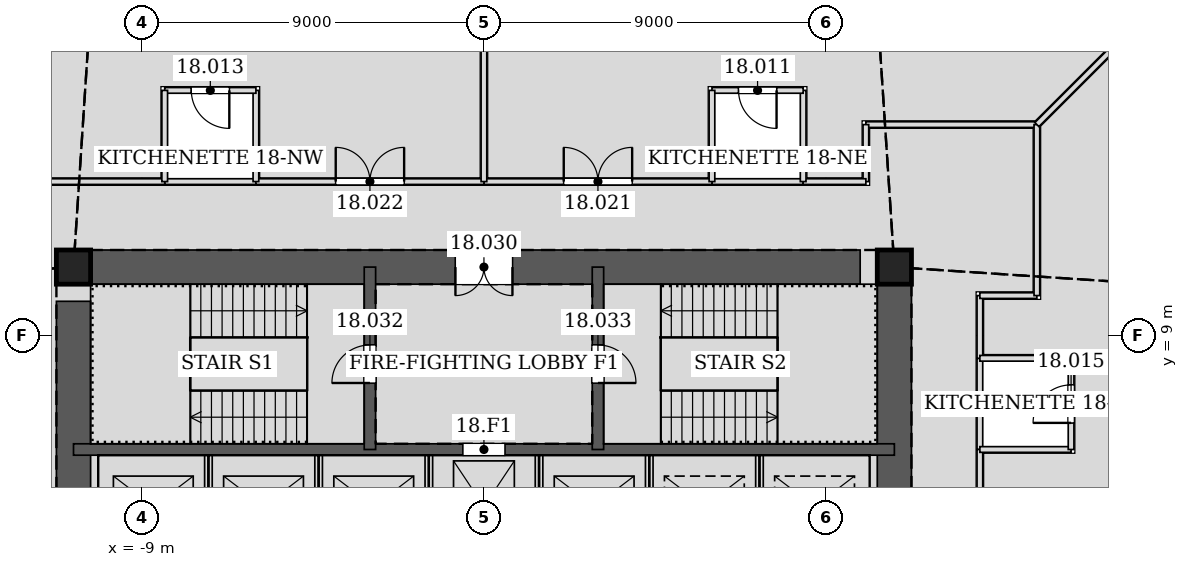
"""IFC4 building model, lengths in metres.
Left out: names, types, materials, properties, quantities, classifications, styles, units other than length and angle.
Written with IfcOpenShell. Run it as: python <this file> out.ifc"""

import sys

from ifc_helpers import new_model, si_unit, direction, frame, frame_2d, origin, origin_2d, place, context, subcontext, project, spatial, rectangle, hollow_rectangle, extrude, element, fill, save


model = new_model("IFC4")
c1 = context("Model", 3, precision=1e-05, world=origin(), true_north=direction((0.0, 1.0)))
c2 = subcontext(c1, "Body", "Model", "MODEL_VIEW")
j1 = project(units=[si_unit("LENGTHUNIT", "METRE"), si_unit("PLANEANGLEUNIT", "RADIAN")], contexts=[c1])
p1 = place(None, origin())
s1 = spatial("IfcSite", under=j1, at=p1, CompositionType="ELEMENT")
p2 = place(p1, origin())
s2 = spatial("IfcBuilding", under=s1, at=p2, CompositionType="ELEMENT")
p3 = place(p2, frame((0.0, 0.0, 83.4)))
s3 = spatial("IfcBuildingStorey", under=s2, at=p3, CompositionType="ELEMENT", Elevation=83.4)
for number, where, z_axis, x_axis in (
    (1, (10.8, 10.8, 0.0), (0.0, 0.0, 1.0), (1.0, 0.0, 0.0)),
    (2, (-10.8, 10.8, 0.0), (0.0, 0.0, 1.0), (1.0, 0.0, 0.0)),
):
    element("IfcColumn", number, at=place(p3, frame(where, z_axis=z_axis, x_axis=x_axis)), inside=s3, PredefinedType="COLUMN", context=c2, shape_type="SweptSolid", body=[
        extrude(hollow_rectangle(XDim=0.9, YDim=0.9, WallThickness=0.06, at=origin_2d()), origin(), (0.0, 0.0, 1.0), 4.2),
    ])
p4 = place(p3, frame((10.8, -10.8, 0.0), z_axis=(0.0, 0.0, 1.0), x_axis=(0.0, 1.0, 0.0)))
e3 = element("IfcWall", 3, at=p4, inside=s3, PredefinedType="SOLIDWALL", context=c2, shape_type="SweptSolid", body=[
    extrude(rectangle(XDim=21.6, YDim=0.9, at=frame_2d((10.8, 0.0))), origin(), (0.0, 0.0, 1.0), 4.2),
])
p5 = place(p4, frame((11.7, 0.0, 0.0)))
e4 = element("IfcOpeningElement", 4, at=p5, cuts=e3, PredefinedType="OPENING", context=c2, shape_type="SweptSolid", body=[
    extrude(rectangle(XDim=1.2, YDim=2.1, at=frame_2d((0.6, 1.05))), frame((0.0, 0.46, 0.0), z_axis=(0.0, -1.0, 0.0), x_axis=(1.0, 0.0, 0.0)), (0.0, 0.0, 1.0), 0.92),
])
p6 = place(p4, frame((8.7, 0.0, 0.0)))
e5 = element("IfcOpeningElement", 5, at=p6, cuts=e3, PredefinedType="OPENING", context=c2, shape_type="SweptSolid", body=[
    extrude(rectangle(XDim=1.2, YDim=2.1, at=frame_2d((0.6, 1.05))), frame((0.0, 0.46, 0.0), z_axis=(0.0, -1.0, 0.0), x_axis=(1.0, 0.0, 0.0)), (0.0, 0.0, 1.0), 0.92),
])
p7 = place(p3, frame((10.8, 10.8, 0.0), z_axis=(0.0, 0.0, 1.0), x_axis=(-1.0, 0.0, 0.0)))
e6 = element("IfcWall", 6, at=p7, inside=s3, PredefinedType="SOLIDWALL", context=c2, shape_type="SweptSolid", body=[
    extrude(rectangle(XDim=21.6, YDim=0.9, at=frame_2d((10.8, 0.0))), origin(), (0.0, 0.0, 1.0), 4.2),
])
p8 = place(p7, frame((10.05, 0.0, 0.0)))
e7 = element("IfcOpeningElement", 7, at=p8, cuts=e6, PredefinedType="OPENING", context=c2, shape_type="SweptSolid", body=[
    extrude(rectangle(XDim=1.5, YDim=2.1, at=frame_2d((0.75, 1.05))), frame((0.0, 0.46, 0.0), z_axis=(0.0, -1.0, 0.0), x_axis=(1.0, 0.0, 0.0)), (0.0, 0.0, 1.0), 0.92),
])
p9 = place(p3, frame((-10.8, 10.8, 0.0), z_axis=(0.0, 0.0, 1.0), x_axis=(0.0, -1.0, 0.0)))
e8 = element("IfcWall", 8, at=p9, inside=s3, PredefinedType="SOLIDWALL", context=c2, shape_type="SweptSolid", body=[
    extrude(rectangle(XDim=21.6, YDim=0.9, at=frame_2d((10.8, 0.0))), origin(), (0.0, 0.0, 1.0), 4.2),
])
p10 = place(p9, frame((8.7, 0.0, 0.0)))
e9 = element("IfcOpeningElement", 9, at=p10, cuts=e8, PredefinedType="OPENING", context=c2, shape_type="SweptSolid", body=[
    extrude(rectangle(XDim=1.2, YDim=2.1, at=frame_2d((0.6, 1.05))), frame((0.0, 0.46, 0.0), z_axis=(0.0, -1.0, 0.0), x_axis=(1.0, 0.0, 0.0)), (0.0, 0.0, 1.0), 0.92),
])
p11 = place(p9, frame((11.7, 0.0, 0.0)))
e10 = element("IfcOpeningElement", 10, at=p11, cuts=e8, PredefinedType="OPENING", context=c2, shape_type="SweptSolid", body=[
    extrude(rectangle(XDim=1.2, YDim=2.1, at=frame_2d((0.6, 1.05))), frame((0.0, 0.46, 0.0), z_axis=(0.0, -1.0, 0.0), x_axis=(1.0, 0.0, 0.0)), (0.0, 0.0, 1.0), 0.92),
])
p12 = place(p3, frame((-10.8, 6.0, 0.0), z_axis=(0.0, 0.0, 1.0), x_axis=(1.0, 0.0, 0.0)))
e11 = element("IfcWall", 11, at=p12, inside=s3, PredefinedType="SOLIDWALL", context=c2, shape_type="SweptSolid", body=[
    extrude(rectangle(XDim=21.6, YDim=0.3, at=frame_2d((10.8, 0.0))), origin(), (0.0, 0.0, 1.0), 4.2),
])
p13 = place(p12, frame((10.25, 0.0, 0.0)))
e12 = element("IfcOpeningElement", 12, at=p13, cuts=e11, PredefinedType="OPENING", context=c2, shape_type="SweptSolid", body=[
    extrude(rectangle(XDim=1.1, YDim=2.1, at=frame_2d((0.55, 1.05))), frame((0.0, 0.16, 0.0), z_axis=(0.0, -1.0, 0.0), x_axis=(1.0, 0.0, 0.0)), (0.0, 0.0, 1.0), 0.32),
])
p14 = place(p3, frame((-3.0, 6.0, 0.0), z_axis=(0.0, 0.0, 1.0), x_axis=(0.0, 1.0, 0.0)))
e13 = element("IfcWall", 13, at=p14, inside=s3, PredefinedType="SOLIDWALL", context=c2, shape_type="SweptSolid", body=[
    extrude(rectangle(XDim=4.8, YDim=0.3, at=frame_2d((2.4, 0.0))), origin(), (0.0, 0.0, 1.0), 4.2),
])
p15 = place(p14, frame((1.75, 0.0, 0.0)))
e14 = element("IfcOpeningElement", 14, at=p15, cuts=e13, PredefinedType="OPENING", context=c2, shape_type="SweptSolid", body=[
    extrude(rectangle(XDim=1.0, YDim=2.1, at=frame_2d((0.5, 1.05))), frame((0.0, 0.16, 0.0), z_axis=(0.0, -1.0, 0.0), x_axis=(1.0, 0.0, 0.0)), (0.0, 0.0, 1.0), 0.32),
])
p16 = place(p3, frame((3.0, 6.0, 0.0), z_axis=(0.0, 0.0, 1.0), x_axis=(0.0, 1.0, 0.0)))
e15 = element("IfcWall", 15, at=p16, inside=s3, PredefinedType="SOLIDWALL", context=c2, shape_type="SweptSolid", body=[
    extrude(rectangle(XDim=4.8, YDim=0.3, at=frame_2d((2.4, 0.0))), origin(), (0.0, 0.0, 1.0), 4.2),
])
p17 = place(p16, frame((1.75, 0.0, 0.0)))
e16 = element("IfcOpeningElement", 16, at=p17, cuts=e15, PredefinedType="OPENING", context=c2, shape_type="SweptSolid", body=[
    extrude(rectangle(XDim=1.0, YDim=2.1, at=frame_2d((0.5, 1.05))), frame((0.0, 0.16, 0.0), z_axis=(0.0, -1.0, 0.0), x_axis=(1.0, 0.0, 0.0)), (0.0, 0.0, 1.0), 0.32),
])
for number, where, z_axis, x_axis in (
    (17, (8.401, 13.05, 0.0), (0.0, 0.0, 1.0), (-1.0, 0.0, 0.0)),
    (18, (-5.999, 13.05, 0.0), (0.0, 0.0, 1.0), (-1.0, 0.0, 0.0)),
    (19, (13.05, 5.999, 0.0), (0.0, 0.0, 1.0), (0.0, 1.0, 0.0)),
):
    element("IfcWall", number, at=place(p3, frame(where, z_axis=z_axis, x_axis=x_axis)), inside=s3, PredefinedType="PARTITIONING", context=c2, shape_type="SweptSolid", body=[
        extrude(rectangle(XDim=2.402, YDim=0.15, at=frame_2d((1.201, 0.0))), origin(), (0.0, 0.0, 1.0), 4.035),
    ])
p18 = place(p3, frame((6.001, 13.05, 0.0), z_axis=(0.0, 0.0, 1.0), x_axis=(-1.0, 0.0, 0.0)))
e20 = element("IfcWall", 20, at=p18, inside=s3, PredefinedType="PARTITIONING", context=c2, shape_type="SweptSolid", body=[
    extrude(rectangle(XDim=6.002, YDim=0.15, at=frame_2d((3.001, 0.0))), origin(), (0.0, 0.0, 1.0), 3.065),
])
p19 = place(p18, frame((2.101, 0.0, 0.0)))
e21 = element("IfcOpeningElement", 21, at=p19, cuts=e20, PredefinedType="OPENING", context=c2, shape_type="SweptSolid", body=[
    extrude(rectangle(XDim=1.8, YDim=2.4, at=frame_2d((0.9, 1.2))), frame((0.0, 0.085, 0.0), z_axis=(0.0, -1.0, 0.0), x_axis=(1.0, 0.0, 0.0)), (0.0, 0.0, 1.0), 0.17),
])
p20 = place(p3, frame((14.55, 14.55, 0.0), z_axis=(0.0, 0.0, 1.0), x_axis=(-1.0, 0.0, 0.0)))
e22 = element("IfcWall", 22, at=p20, inside=s3, PredefinedType="PARTITIONING", context=c2, shape_type="SweptSolid", body=[
    extrude(rectangle(XDim=4.5, YDim=0.15, at=frame_2d((2.25, 0.0))), origin(), (0.0, 0.0, 1.0), 3.014),
])
p21 = place(p3, frame((10.05, 14.55, 0.0), z_axis=(0.0, 0.0, 1.0), x_axis=(0.0, -1.0, 0.0)))
e23 = element("IfcWall", 23, at=p21, inside=s3, PredefinedType="PARTITIONING", context=c2, shape_type="SweptSolid", body=[
    extrude(rectangle(XDim=1.5, YDim=0.15, at=frame_2d((0.75, 0.0))), origin(), (0.0, 0.0, 1.0), 3.492),
])
p22 = place(p3, frame((10.05, 13.05, 0.0), z_axis=(0.0, 0.0, 1.0), x_axis=(-1.0, 0.0, 0.0)))
e24 = element("IfcWall", 24, at=p22, inside=s3, PredefinedType="PARTITIONING", context=c2, shape_type="SweptSolid", body=[
    extrude(rectangle(XDim=1.651, YDim=0.15, at=frame_2d((0.826, 0.0))), origin(), (0.0, 0.0, 1.0), 4.035),
])
p23 = place(p3, frame((-8.399, 13.05, 0.0), z_axis=(0.0, 0.0, 1.0), x_axis=(-1.0, 0.0, 0.0)))
e25 = element("IfcWall", 25, at=p23, inside=s3, PredefinedType="PARTITIONING", context=c2, shape_type="SweptSolid", body=[
    extrude(rectangle(XDim=4.651, YDim=0.15, at=frame_2d((2.326, 0.0))), origin(), (0.0, 0.0, 1.0), 3.014),
])
p24 = place(p3, frame((0.001, 13.05, 0.0), z_axis=(0.0, 0.0, 1.0), x_axis=(-1.0, 0.0, 0.0)))
e26 = element("IfcWall", 26, at=p24, inside=s3, PredefinedType="PARTITIONING", context=c2, shape_type="SweptSolid", body=[
    extrude(rectangle(XDim=6.002, YDim=0.15, at=frame_2d((3.001, 0.0))), origin(), (0.0, 0.0, 1.0), 3.065),
])
p25 = place(p24, frame((2.101, 0.0, 0.0)))
e27 = element("IfcOpeningElement", 27, at=p25, cuts=e26, PredefinedType="OPENING", context=c2, shape_type="SweptSolid", body=[
    extrude(rectangle(XDim=1.8, YDim=2.4, at=frame_2d((0.9, 1.2))), frame((0.0, 0.085, 0.0), z_axis=(0.0, -1.0, 0.0), x_axis=(1.0, 0.0, 0.0)), (0.0, 0.0, 1.0), 0.17),
])
p26 = place(p3, frame((13.05, -10.05, 0.0), z_axis=(0.0, 0.0, 1.0), x_axis=(0.0, 1.0, 0.0)))
e28 = element("IfcWall", 28, at=p26, inside=s3, PredefinedType="PARTITIONING", context=c2, shape_type="SweptSolid", body=[
    extrude(rectangle(XDim=16.051, YDim=0.15, at=frame_2d((8.025, 0.0))), origin(), (0.0, 0.0, 1.0), 3.065),
])
p27 = place(p26, frame((7.125, 0.0, 0.0)))
e29 = element("IfcOpeningElement", 29, at=p27, cuts=e28, PredefinedType="OPENING", context=c2, shape_type="SweptSolid", body=[
    extrude(rectangle(XDim=1.8, YDim=2.4, at=frame_2d((0.9, 1.2))), frame((0.0, 0.085, 0.0), z_axis=(0.0, -1.0, 0.0), x_axis=(1.0, 0.0, 0.0)), (0.0, 0.0, 1.0), 0.17),
])
p28 = place(p3, frame((13.05, 8.399, 0.0), z_axis=(0.0, 0.0, 1.0), x_axis=(0.0, 1.0, 0.0)))
e30 = element("IfcWall", 30, at=p28, inside=s3, PredefinedType="PARTITIONING", context=c2, shape_type="SweptSolid", body=[
    extrude(rectangle(XDim=1.651, YDim=0.15, at=frame_2d((0.826, 0.0))), origin(), (0.0, 0.0, 1.0), 4.035),
])
p29 = place(p3, frame((13.05, 10.05, 0.0), z_axis=(0.0, 0.0, 1.0), x_axis=(1.0, 0.0, 0.0)))
e31 = element("IfcWall", 31, at=p29, inside=s3, PredefinedType="PARTITIONING", context=c2, shape_type="SweptSolid", body=[
    extrude(rectangle(XDim=1.5, YDim=0.15, at=frame_2d((0.75, 0.0))), origin(), (0.0, 0.0, 1.0), 3.492),
])
p30 = place(p3, frame((14.55, 10.05, 0.0), z_axis=(0.0, 0.0, 1.0), x_axis=(0.0, 1.0, 0.0)))
e32 = element("IfcWall", 32, at=p30, inside=s3, PredefinedType="PARTITIONING", context=c2, shape_type="SweptSolid", body=[
    extrude(rectangle(XDim=4.5, YDim=0.15, at=frame_2d((2.25, 0.0))), origin(), (0.0, 0.0, 1.0), 3.014),
])
p31 = place(p3, frame((8.4, 13.05, 0.0), z_axis=(0.0, 0.0, 1.0), x_axis=(0.0, 1.0, 0.0)))
e33 = element("IfcWall", 33, at=p31, inside=s3, PredefinedType="PARTITIONING", context=c2, shape_type="SweptSolid", body=[
    extrude(rectangle(XDim=2.4, YDim=0.15, at=frame_2d((1.2, 0.0))), origin(), (0.0, 0.0, 1.0), 3.492),
])
p32 = place(p3, frame((8.4, 15.45, 0.0), z_axis=(0.0, 0.0, 1.0), x_axis=(-1.0, 0.0, 0.0)))
e34 = element("IfcWall", 34, at=p32, inside=s3, PredefinedType="PARTITIONING", context=c2, shape_type="SweptSolid", body=[
    extrude(rectangle(XDim=2.4, YDim=0.15, at=frame_2d((1.2, 0.0))), origin(), (0.0, 0.0, 1.0), 4.035),
])
p33 = place(p32, frame((0.7, 0.0, 0.0)))
e35 = element("IfcOpeningElement", 35, at=p33, cuts=e34, PredefinedType="OPENING", context=c2, shape_type="SweptSolid", body=[
    extrude(rectangle(XDim=1.0, YDim=2.1, at=frame_2d((0.5, 1.05))), frame((0.0, 0.085, 0.0), z_axis=(0.0, -1.0, 0.0), x_axis=(1.0, 0.0, 0.0)), (0.0, 0.0, 1.0), 0.17),
])
for number, where, z_axis, x_axis in (
    (36, (6.0, 15.45, 0.0), (0.0, 0.0, 1.0), (0.0, -1.0, 0.0)),
    (37, (-6.0, 13.05, 0.0), (0.0, 0.0, 1.0), (0.0, 1.0, 0.0)),
):
    element("IfcWall", number, at=place(p3, frame(where, z_axis=z_axis, x_axis=x_axis)), inside=s3, PredefinedType="PARTITIONING", context=c2, shape_type="SweptSolid", body=[
        extrude(rectangle(XDim=2.4, YDim=0.15, at=frame_2d((1.2, 0.0))), origin(), (0.0, 0.0, 1.0), 3.492),
    ])
p34 = place(p3, frame((-6.0, 15.45, 0.0), z_axis=(0.0, 0.0, 1.0), x_axis=(-1.0, 0.0, 0.0)))
e38 = element("IfcWall", 38, at=p34, inside=s3, PredefinedType="PARTITIONING", context=c2, shape_type="SweptSolid", body=[
    extrude(rectangle(XDim=2.4, YDim=0.15, at=frame_2d((1.2, 0.0))), origin(), (0.0, 0.0, 1.0), 4.035),
])
p35 = place(p34, frame((0.7, 0.0, 0.0)))
e39 = element("IfcOpeningElement", 39, at=p35, cuts=e38, PredefinedType="OPENING", context=c2, shape_type="SweptSolid", body=[
    extrude(rectangle(XDim=1.0, YDim=2.1, at=frame_2d((0.5, 1.05))), frame((0.0, 0.085, 0.0), z_axis=(0.0, -1.0, 0.0), x_axis=(1.0, 0.0, 0.0)), (0.0, 0.0, 1.0), 0.17),
])
for number, where, z_axis, x_axis in (
    (40, (-8.4, 15.45, 0.0), (0.0, 0.0, 1.0), (0.0, -1.0, 0.0)),
    (41, (13.05, 6.0, 0.0), (0.0, 0.0, 1.0), (1.0, 0.0, 0.0)),
):
    element("IfcWall", number, at=place(p3, frame(where, z_axis=z_axis, x_axis=x_axis)), inside=s3, PredefinedType="PARTITIONING", context=c2, shape_type="SweptSolid", body=[
        extrude(rectangle(XDim=2.4, YDim=0.15, at=frame_2d((1.2, 0.0))), origin(), (0.0, 0.0, 1.0), 3.492),
    ])
p36 = place(p3, frame((15.45, 6.0, 0.0), z_axis=(0.0, 0.0, 1.0), x_axis=(0.0, 1.0, 0.0)))
e42 = element("IfcWall", 42, at=p36, inside=s3, PredefinedType="PARTITIONING", context=c2, shape_type="SweptSolid", body=[
    extrude(rectangle(XDim=2.4, YDim=0.15, at=frame_2d((1.2, 0.0))), origin(), (0.0, 0.0, 1.0), 4.035),
])
p37 = place(p36, frame((0.7, 0.0, 0.0)))
e43 = element("IfcOpeningElement", 43, at=p37, cuts=e42, PredefinedType="OPENING", context=c2, shape_type="SweptSolid", body=[
    extrude(rectangle(XDim=1.0, YDim=2.1, at=frame_2d((0.5, 1.05))), frame((0.0, 0.085, 0.0), z_axis=(0.0, -1.0, 0.0), x_axis=(1.0, 0.0, 0.0)), (0.0, 0.0, 1.0), 0.17),
])
p38 = place(p3, frame((15.45, 8.4, 0.0), z_axis=(0.0, 0.0, 1.0), x_axis=(-1.0, 0.0, 0.0)))
e44 = element("IfcWall", 44, at=p38, inside=s3, PredefinedType="PARTITIONING", context=c2, shape_type="SweptSolid", body=[
    extrude(rectangle(XDim=2.4, YDim=0.15, at=frame_2d((1.2, 0.0))), origin(), (0.0, 0.0, 1.0), 3.492),
])
p39 = place(p3, frame((0.0, 24.468, 0.0), z_axis=(0.0, 0.0, 1.0), x_axis=(0.0, -1.0, 0.0)))
e45 = element("IfcWall", 45, at=p39, inside=s3, PredefinedType="PARTITIONING", context=c2, shape_type="SweptSolid", body=[
    extrude(rectangle(XDim=11.417, YDim=0.15, at=frame_2d((5.709, 0.0))), origin(), (0.0, 0.0, 1.0), 3.065),
])
p40 = place(p3, frame((14.55, 14.55, 0.0), z_axis=(0.0, 0.0, 1.0), x_axis=(0.707106781187, 0.707106781187, 0.0)))
e46 = element("IfcWall", 46, at=p40, inside=s3, PredefinedType="PARTITIONING", context=c2, shape_type="SweptSolid", body=[
    extrude(rectangle(XDim=3.891, YDim=0.15, at=frame_2d((1.945, 0.0))), origin(), (0.0, 0.0, 1.0), 3.113),
])
for number, where, z_axis, x_axis in (
    (47, (-7.25, 3.15, 0.0), (0.0, 0.0, 1.0), (0.0, 1.0, 0.0)),
    (48, (-4.35, 3.15, 0.0), (0.0, 0.0, 1.0), (0.0, 1.0, 0.0)),
    (49, (-1.45, 3.15, 0.0), (0.0, 0.0, 1.0), (0.0, 1.0, 0.0)),
    (50, (1.45, 3.15, 0.0), (0.0, 0.0, 1.0), (0.0, 1.0, 0.0)),
    (51, (4.35, 3.15, 0.0), (0.0, 0.0, 1.0), (0.0, 1.0, 0.0)),
    (52, (7.25, 3.15, 0.0), (0.0, 0.0, 1.0), (0.0, 1.0, 0.0)),
):
    element("IfcWall", number, at=place(p3, frame(where, z_axis=z_axis, x_axis=x_axis)), inside=s3, PredefinedType="PARTITIONING", context=c2, shape_type="SweptSolid", body=[
        extrude(rectangle(XDim=2.7, YDim=0.2, at=frame_2d((1.35, 0.0))), origin(), (0.0, 0.0, 1.0), 4.2),
    ])
p41 = place(p33, origin())
e53 = element("IfcDoor", 53, at=p41, inside=s3, OperationType="SINGLE_SWING_LEFT", PredefinedType="DOOR", context=c2, shape_type="SweptSolid", body=[
    extrude(rectangle(XDim=1.0, YDim=2.1, at=frame_2d((0.5, 1.05))), frame((0.0, 0.025, 0.0), z_axis=(0.0, -1.0, 0.0), x_axis=(1.0, 0.0, 0.0)), (0.0, 0.0, 1.0), 0.05),
])
fill(e35, e53)
p42 = place(p35, origin())
e54 = element("IfcDoor", 54, at=p42, inside=s3, OperationType="SINGLE_SWING_LEFT", PredefinedType="DOOR", context=c2, shape_type="SweptSolid", body=[
    extrude(rectangle(XDim=1.0, YDim=2.1, at=frame_2d((0.5, 1.05))), frame((0.0, 0.025, 0.0), z_axis=(0.0, -1.0, 0.0), x_axis=(1.0, 0.0, 0.0)), (0.0, 0.0, 1.0), 0.05),
])
fill(e39, e54)
p43 = place(p37, origin())
e55 = element("IfcDoor", 55, at=p43, inside=s3, OperationType="SINGLE_SWING_LEFT", PredefinedType="DOOR", context=c2, shape_type="SweptSolid", body=[
    extrude(rectangle(XDim=1.0, YDim=2.1, at=frame_2d((0.5, 1.05))), frame((0.0, 0.025, 0.0), z_axis=(0.0, -1.0, 0.0), x_axis=(1.0, 0.0, 0.0)), (0.0, 0.0, 1.0), 0.05),
])
fill(e43, e55)
p44 = place(p19, frame((1.8, 0.0, 0.0), z_axis=(0.0, 0.0, 1.0), x_axis=(-1.0, 0.0, 0.0)))
e56 = element("IfcDoor", 56, at=p44, inside=s3, OperationType="DOUBLE_DOOR_SINGLE_SWING", PredefinedType="DOOR", context=c2, shape_type="SweptSolid", body=[
    extrude(rectangle(XDim=1.8, YDim=2.4, at=frame_2d((0.9, 1.2))), frame((0.0, 0.025, 0.0), z_axis=(0.0, -1.0, 0.0), x_axis=(1.0, 0.0, 0.0)), (0.0, 0.0, 1.0), 0.05),
])
fill(e21, e56)
p45 = place(p25, frame((1.8, 0.0, 0.0), z_axis=(0.0, 0.0, 1.0), x_axis=(-1.0, 0.0, 0.0)))
e57 = element("IfcDoor", 57, at=p45, inside=s3, OperationType="DOUBLE_DOOR_SINGLE_SWING", PredefinedType="DOOR", context=c2, shape_type="SweptSolid", body=[
    extrude(rectangle(XDim=1.8, YDim=2.4, at=frame_2d((0.9, 1.2))), frame((0.0, 0.025, 0.0), z_axis=(0.0, -1.0, 0.0), x_axis=(1.0, 0.0, 0.0)), (0.0, 0.0, 1.0), 0.05),
])
fill(e27, e57)
p46 = place(p8, origin())
e58 = element("IfcDoor", 58, at=p46, inside=s3, OperationType="DOUBLE_DOOR_SINGLE_SWING", PredefinedType="DOOR", context=c2, shape_type="SweptSolid", body=[
    extrude(rectangle(XDim=1.5, YDim=2.1, at=frame_2d((0.75, 1.05))), frame((0.0, 0.025, 0.0), z_axis=(0.0, -1.0, 0.0), x_axis=(1.0, 0.0, 0.0)), (0.0, 0.0, 1.0), 0.05),
])
fill(e7, e58)
p47 = place(p15, origin())
e59 = element("IfcDoor", 59, at=p47, inside=s3, OperationType="SINGLE_SWING_LEFT", PredefinedType="DOOR", context=c2, shape_type="SweptSolid", body=[
    extrude(rectangle(XDim=1.0, YDim=2.1, at=frame_2d((0.5, 1.05))), frame((0.0, 0.025, 0.0), z_axis=(0.0, -1.0, 0.0), x_axis=(1.0, 0.0, 0.0)), (0.0, 0.0, 1.0), 0.05),
])
fill(e14, e59)
p48 = place(p17, frame((1.0, 0.0, 0.0), z_axis=(0.0, 0.0, 1.0), x_axis=(-1.0, 0.0, 0.0)))
e60 = element("IfcDoor", 60, at=p48, inside=s3, OperationType="SINGLE_SWING_RIGHT", PredefinedType="DOOR", context=c2, shape_type="SweptSolid", body=[
    extrude(rectangle(XDim=1.0, YDim=2.1, at=frame_2d((0.5, 1.05))), frame((0.0, 0.025, 0.0), z_axis=(0.0, -1.0, 0.0), x_axis=(1.0, 0.0, 0.0)), (0.0, 0.0, 1.0), 0.05),
])
fill(e16, e60)
p49 = place(p13, origin())
e61 = element("IfcDoor", 61, at=p49, inside=s3, OperationType="DOUBLE_DOOR_SLIDING", PredefinedType="DOOR", context=c2, shape_type="SweptSolid", body=[
    extrude(rectangle(XDim=1.1, YDim=2.1, at=frame_2d((0.55, 1.05))), frame((0.0, 0.025, 0.0), z_axis=(0.0, -1.0, 0.0), x_axis=(1.0, 0.0, 0.0)), (0.0, 0.0, 1.0), 0.05),
])
fill(e12, e61)
save(model, sys.argv[1])
